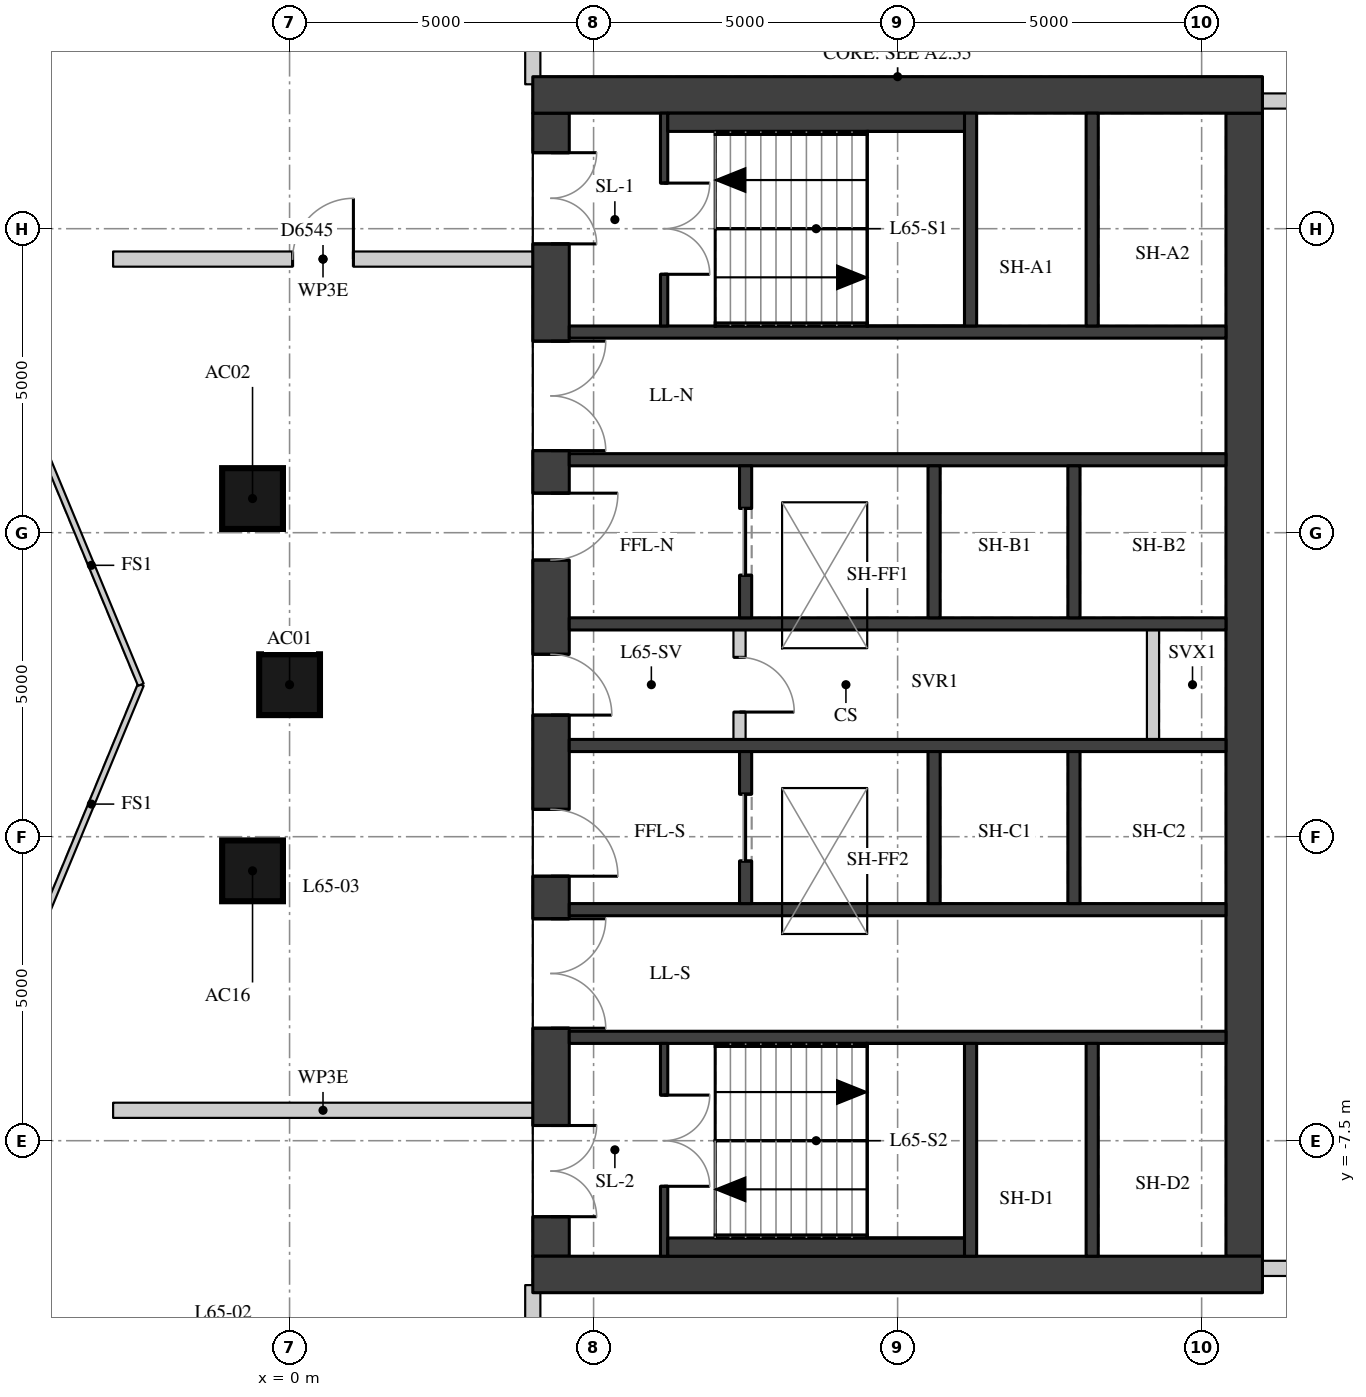
"""IFC4 building model, lengths in metres.
Left out: names, types, materials, properties, quantities, classifications, styles, units other than length and angle.
Written with IfcOpenShell. Run it as: python <this file> out.ifc"""

import sys

from ifc_helpers import new_model, si_unit, direction, frame, frame_2d, origin, origin_2d, place, context, subcontext, project, spatial, rectangle, extrude, element, fill, save


model = new_model("IFC4")
c1 = context("Model", 3, precision=1e-05, world=origin(), true_north=direction((0.0, 1.0)))
c2 = subcontext(c1, "Body", "Model", "MODEL_VIEW")
j1 = project(units=[si_unit("LENGTHUNIT", "METRE"), si_unit("PLANEANGLEUNIT", "RADIAN")], contexts=[c1])
p1 = place(None, origin())
s1 = spatial("IfcSite", under=j1, at=p1, CompositionType="ELEMENT")
p2 = place(p1, origin())
s2 = spatial("IfcBuilding", under=s1, at=p2, CompositionType="ELEMENT")
p3 = place(p2, frame((0.0, 0.0, 228.8)))
s3 = spatial("IfcBuildingStorey", under=s2, at=p3, CompositionType="ELEMENT", Elevation=228.8)
for number, where, z_axis, x_axis in (
    (1, (0.0, 0.0, 0.0), (0.0, 0.0, 1.0), (1.0, 0.0, 0.0)),
    (2, (-0.609, 3.062, 0.0), (0.0, 0.0, 1.0), (1.0, 0.0, 0.0)),
    (3, (-0.609, -3.062, 0.0), (0.0, 0.0, 1.0), (1.0, 0.0, 0.0)),
):
    element("IfcColumn", number, at=place(p3, frame(where, z_axis=z_axis, x_axis=x_axis)), inside=s3, PredefinedType="COLUMN", context=c2, shape_type="SweptSolid", body=[
        extrude(rectangle(XDim=1.0, YDim=1.0, at=origin_2d()), origin(), (0.0, 0.0, 1.0), 4.5),
    ])
p4 = place(p3, frame((4.3, -9.4, 0.0), z_axis=(0.0, 0.0, 1.0), x_axis=(0.0, 1.0, 0.0)))
e4 = element("IfcWall", 4, at=p4, inside=s3, PredefinedType="SHEAR", context=c2, shape_type="SweptSolid", body=[
    extrude(rectangle(XDim=18.8, YDim=0.6, at=frame_2d((9.4, 0.0))), origin(), (0.0, 0.0, 1.0), 4.22),
])
p5 = place(p4, frame((0.65, 0.0, 0.0)))
e5 = element("IfcOpeningElement", 5, at=p5, cuts=e4, PredefinedType="OPENING", context=c2, shape_type="SweptSolid", body=[
    extrude(rectangle(XDim=1.5, YDim=2.1, at=frame_2d((0.75, 1.05))), frame((0.0, 0.31, 0.0), z_axis=(0.0, -1.0, 0.0), x_axis=(1.0, 0.0, 0.0)), (0.0, 0.0, 1.0), 0.62),
])
p6 = place(p4, frame((3.75, 0.0, 0.0)))
e6 = element("IfcOpeningElement", 6, at=p6, cuts=e4, PredefinedType="OPENING", context=c2, shape_type="SweptSolid", body=[
    extrude(rectangle(XDim=1.8, YDim=2.1, at=frame_2d((0.9, 1.05))), frame((0.0, 0.31, 0.0), z_axis=(0.0, -1.0, 0.0), x_axis=(1.0, 0.0, 0.0)), (0.0, 0.0, 1.0), 0.62),
])
p7 = place(p4, frame((6.25, 0.0, 0.0)))
e7 = element("IfcOpeningElement", 7, at=p7, cuts=e4, PredefinedType="OPENING", context=c2, shape_type="SweptSolid", body=[
    extrude(rectangle(XDim=1.1, YDim=2.1, at=frame_2d((0.55, 1.05))), frame((0.0, 0.31, 0.0), z_axis=(0.0, -1.0, 0.0), x_axis=(1.0, 0.0, 0.0)), (0.0, 0.0, 1.0), 0.62),
])
p8 = place(p4, frame((8.9, 0.0, 0.0)))
e8 = element("IfcOpeningElement", 8, at=p8, cuts=e4, PredefinedType="OPENING", context=c2, shape_type="SweptSolid", body=[
    extrude(rectangle(XDim=1.0, YDim=2.1, at=frame_2d((0.5, 1.05))), frame((0.0, 0.31, 0.0), z_axis=(0.0, -1.0, 0.0), x_axis=(1.0, 0.0, 0.0)), (0.0, 0.0, 1.0), 0.62),
])
p9 = place(p4, frame((11.45, 0.0, 0.0)))
e9 = element("IfcOpeningElement", 9, at=p9, cuts=e4, PredefinedType="OPENING", context=c2, shape_type="SweptSolid", body=[
    extrude(rectangle(XDim=1.1, YDim=2.1, at=frame_2d((0.55, 1.05))), frame((0.0, 0.31, 0.0), z_axis=(0.0, -1.0, 0.0), x_axis=(1.0, 0.0, 0.0)), (0.0, 0.0, 1.0), 0.62),
])
p10 = place(p4, frame((13.25, 0.0, 0.0)))
e10 = element("IfcOpeningElement", 10, at=p10, cuts=e4, PredefinedType="OPENING", context=c2, shape_type="SweptSolid", body=[
    extrude(rectangle(XDim=1.8, YDim=2.1, at=frame_2d((0.9, 1.05))), frame((0.0, 0.31, 0.0), z_axis=(0.0, -1.0, 0.0), x_axis=(1.0, 0.0, 0.0)), (0.0, 0.0, 1.0), 0.62),
])
p11 = place(p4, frame((16.65, 0.0, 0.0)))
e11 = element("IfcOpeningElement", 11, at=p11, cuts=e4, PredefinedType="OPENING", context=c2, shape_type="SweptSolid", body=[
    extrude(rectangle(XDim=1.5, YDim=2.1, at=frame_2d((0.75, 1.05))), frame((0.0, 0.31, 0.0), z_axis=(0.0, -1.0, 0.0), x_axis=(1.0, 0.0, 0.0)), (0.0, 0.0, 1.0), 0.62),
])
p12 = place(p3, frame((15.7, -9.4, 0.0), z_axis=(0.0, 0.0, 1.0), x_axis=(0.0, 1.0, 0.0)))
e12 = element("IfcWall", 12, at=p12, inside=s3, PredefinedType="SHEAR", context=c2, shape_type="SweptSolid", body=[
    extrude(rectangle(XDim=18.8, YDim=0.6, at=frame_2d((9.4, 0.0))), origin(), (0.0, 0.0, 1.0), 4.22),
])
for number, where, z_axis, x_axis in (
    (13, (4.0, 9.7, 0.0), (0.0, 0.0, 1.0), (1.0, 0.0, 0.0)),
    (14, (4.0, -9.7, 0.0), (0.0, 0.0, 1.0), (1.0, 0.0, 0.0)),
):
    element("IfcWall", number, at=place(p3, frame(where, z_axis=z_axis, x_axis=x_axis)), inside=s3, PredefinedType="SHEAR", context=c2, shape_type="SweptSolid", body=[
        extrude(rectangle(XDim=12.0, YDim=0.6, at=frame_2d((6.0, 0.0))), origin(), (0.0, 0.0, 1.0), 4.22),
    ])
for number, where, z_axis, x_axis in (
    (15, (4.6, 5.8, 0.0), (0.0, 0.0, 1.0), (1.0, 0.0, 0.0)),
    (16, (4.6, 3.7, 0.0), (0.0, 0.0, 1.0), (1.0, 0.0, 0.0)),
    (17, (4.6, 1.0, 0.0), (0.0, 0.0, 1.0), (1.0, 0.0, 0.0)),
    (18, (4.6, -1.0, 0.0), (0.0, 0.0, 1.0), (1.0, 0.0, 0.0)),
    (19, (4.6, -3.7, 0.0), (0.0, 0.0, 1.0), (1.0, 0.0, 0.0)),
    (20, (4.6, -5.8, 0.0), (0.0, 0.0, 1.0), (1.0, 0.0, 0.0)),
):
    element("IfcWall", number, at=place(p3, frame(where, z_axis=z_axis, x_axis=x_axis)), inside=s3, PredefinedType="SHEAR", context=c2, shape_type="SweptSolid", body=[
        extrude(rectangle(XDim=10.8, YDim=0.2, at=frame_2d((5.4, 0.0))), origin(), (0.0, 0.0, 1.0), 4.22),
    ])
for number, where, z_axis, x_axis in (
    (21, (11.2, 5.9, 0.0), (0.0, 0.0, 1.0), (0.0, 1.0, 0.0)),
    (22, (11.2, -9.4, 0.0), (0.0, 0.0, 1.0), (0.0, 1.0, 0.0)),
    (23, (13.2, 5.9, 0.0), (0.0, 0.0, 1.0), (0.0, 1.0, 0.0)),
    (24, (13.2, -9.4, 0.0), (0.0, 0.0, 1.0), (0.0, 1.0, 0.0)),
):
    element("IfcWall", number, at=place(p3, frame(where, z_axis=z_axis, x_axis=x_axis)), inside=s3, PredefinedType="SHEAR", context=c2, shape_type="SweptSolid", body=[
        extrude(rectangle(XDim=3.5, YDim=0.2, at=frame_2d((1.75, 0.0))), origin(), (0.0, 0.0, 1.0), 4.22),
    ])
p13 = place(p3, frame((7.5, 1.1, 0.0), z_axis=(0.0, 0.0, 1.0), x_axis=(0.0, 1.0, 0.0)))
e25 = element("IfcWall", 25, at=p13, inside=s3, PredefinedType="SHEAR", context=c2, shape_type="SweptSolid", body=[
    extrude(rectangle(XDim=2.5, YDim=0.2, at=frame_2d((1.25, 0.0))), origin(), (0.0, 0.0, 1.0), 4.22),
])
p14 = place(p13, frame((0.7, 0.0, 0.0)))
e26 = element("IfcOpeningElement", 26, at=p14, cuts=e25, PredefinedType="OPENING", context=c2, shape_type="SweptSolid", body=[
    extrude(rectangle(XDim=1.1, YDim=2.1, at=frame_2d((0.55, 1.05))), frame((0.0, 0.11, 0.0), z_axis=(0.0, -1.0, 0.0), x_axis=(1.0, 0.0, 0.0)), (0.0, 0.0, 1.0), 0.22),
])
p15 = place(p3, frame((7.5, -3.6, 0.0), z_axis=(0.0, 0.0, 1.0), x_axis=(0.0, 1.0, 0.0)))
e27 = element("IfcWall", 27, at=p15, inside=s3, PredefinedType="SHEAR", context=c2, shape_type="SweptSolid", body=[
    extrude(rectangle(XDim=2.5, YDim=0.2, at=frame_2d((1.25, 0.0))), origin(), (0.0, 0.0, 1.0), 4.22),
])
p16 = place(p15, frame((0.7, 0.0, 0.0)))
e28 = element("IfcOpeningElement", 28, at=p16, cuts=e27, PredefinedType="OPENING", context=c2, shape_type="SweptSolid", body=[
    extrude(rectangle(XDim=1.1, YDim=2.1, at=frame_2d((0.55, 1.05))), frame((0.0, 0.11, 0.0), z_axis=(0.0, -1.0, 0.0), x_axis=(1.0, 0.0, 0.0)), (0.0, 0.0, 1.0), 0.22),
])
for number, where, z_axis, x_axis in (
    (29, (10.6, 1.1, 0.0), (0.0, 0.0, 1.0), (0.0, 1.0, 0.0)),
    (30, (10.6, -3.6, 0.0), (0.0, 0.0, 1.0), (0.0, 1.0, 0.0)),
    (31, (12.9, 1.1, 0.0), (0.0, 0.0, 1.0), (0.0, 1.0, 0.0)),
    (32, (12.9, -3.6, 0.0), (0.0, 0.0, 1.0), (0.0, 1.0, 0.0)),
):
    element("IfcWall", number, at=place(p3, frame(where, z_axis=z_axis, x_axis=x_axis)), inside=s3, PredefinedType="SHEAR", context=c2, shape_type="SweptSolid", body=[
        extrude(rectangle(XDim=2.5, YDim=0.2, at=frame_2d((1.25, 0.0))), origin(), (0.0, 0.0, 1.0), 4.22),
    ])
p17 = place(p3, frame((6.16, 5.9, 0.0), z_axis=(0.0, 0.0, 1.0), x_axis=(0.0, 1.0, 0.0)))
e33 = element("IfcWall", 33, at=p17, inside=s3, PredefinedType="SHEAR", context=c2, shape_type="SweptSolid", body=[
    extrude(rectangle(XDim=3.5, YDim=0.12, at=frame_2d((1.75, 0.0))), origin(), (0.0, 0.0, 1.0), 4.22),
])
p18 = place(p17, frame((0.85, 0.0, 0.0)))
e34 = element("IfcOpeningElement", 34, at=p18, cuts=e33, PredefinedType="OPENING", context=c2, shape_type="SweptSolid", body=[
    extrude(rectangle(XDim=1.5, YDim=2.1, at=frame_2d((0.75, 1.05))), frame((0.0, 0.07, 0.0), z_axis=(0.0, -1.0, 0.0), x_axis=(1.0, 0.0, 0.0)), (0.0, 0.0, 1.0), 0.14),
])
p19 = place(p3, frame((6.16, -9.4, 0.0), z_axis=(0.0, 0.0, 1.0), x_axis=(0.0, 1.0, 0.0)))
e35 = element("IfcWall", 35, at=p19, inside=s3, PredefinedType="SHEAR", context=c2, shape_type="SweptSolid", body=[
    extrude(rectangle(XDim=3.5, YDim=0.12, at=frame_2d((1.75, 0.0))), origin(), (0.0, 0.0, 1.0), 4.22),
])
p20 = place(p19, frame((1.15, 0.0, 0.0)))
e36 = element("IfcOpeningElement", 36, at=p20, cuts=e35, PredefinedType="OPENING", context=c2, shape_type="SweptSolid", body=[
    extrude(rectangle(XDim=1.5, YDim=2.1, at=frame_2d((0.75, 1.05))), frame((0.0, 0.07, 0.0), z_axis=(0.0, -1.0, 0.0), x_axis=(1.0, 0.0, 0.0)), (0.0, 0.0, 1.0), 0.14),
])
p21 = place(p3, frame((7.4, -0.9, 0.0), z_axis=(0.0, 0.0, 1.0), x_axis=(0.0, 1.0, 0.0)))
e37 = element("IfcWall", 37, at=p21, inside=s3, PredefinedType="PARTITIONING", context=c2, shape_type="SweptSolid", body=[
    extrude(rectangle(XDim=1.8, YDim=0.2, at=frame_2d((0.9, 0.0))), origin(), (0.0, 0.0, 1.0), 4.22),
])
p22 = place(p21, frame((0.45, 0.0, 0.0)))
e38 = element("IfcOpeningElement", 38, at=p22, cuts=e37, PredefinedType="OPENING", context=c2, shape_type="SweptSolid", body=[
    extrude(rectangle(XDim=0.9, YDim=2.1, at=frame_2d((0.45, 1.05))), frame((0.0, 0.11, 0.0), z_axis=(0.0, -1.0, 0.0), x_axis=(1.0, 0.0, 0.0)), (0.0, 0.0, 1.0), 0.22),
])
p23 = place(p3, frame((14.2, -0.9, 0.0), z_axis=(0.0, 0.0, 1.0), x_axis=(0.0, 1.0, 0.0)))
e39 = element("IfcWall", 39, at=p23, inside=s3, PredefinedType="PARTITIONING", context=c2, shape_type="SweptSolid", body=[
    extrude(rectangle(XDim=1.8, YDim=0.2, at=frame_2d((0.9, 0.0))), origin(), (0.0, 0.0, 1.0), 4.22),
])
for number, where, z_axis, x_axis in (
    (40, (6.22, 9.25, 0.0), (0.0, 0.0, 1.0), (1.0, 0.0, 0.0)),
    (41, (6.22, -9.25, 0.0), (0.0, 0.0, 1.0), (1.0, 0.0, 0.0)),
):
    element("IfcWall", number, at=place(p3, frame(where, z_axis=z_axis, x_axis=x_axis)), inside=s3, PredefinedType="PARTITIONING", context=c2, shape_type="SweptSolid", body=[
        extrude(rectangle(XDim=4.88, YDim=0.3, at=frame_2d((2.44, 0.0))), origin(), (0.0, 0.0, 1.0), 4.22),
    ])
p24 = place(p3, frame((15.998, -9.6, 0.0), z_axis=(0.0, 0.0, 1.0), x_axis=(1.0, 0.0, 0.0)))
e42 = element("IfcWall", 42, at=p24, inside=s3, PredefinedType="PARTITIONING", context=c2, shape_type="SweptSolid", body=[
    extrude(rectangle(XDim=6.172, YDim=0.25, at=frame_2d((3.086, 0.0))), origin(), (0.0, 0.0, 1.0), 4.22),
])
p25 = place(p3, frame((-2.902, -7.0, 0.0), z_axis=(0.0, 0.0, 1.0), x_axis=(1.0, 0.0, 0.0)))
e43 = element("IfcWall", 43, at=p25, inside=s3, PredefinedType="PARTITIONING", context=c2, shape_type="SweptSolid", body=[
    extrude(rectangle(XDim=6.904, YDim=0.25, at=frame_2d((3.452, 0.0))), origin(), (0.0, 0.0, 1.0), 3.67),
])
p26 = place(p3, frame((-2.902, 7.0, 0.0), z_axis=(0.0, 0.0, 1.0), x_axis=(1.0, 0.0, 0.0)))
e44 = element("IfcWall", 44, at=p26, inside=s3, PredefinedType="PARTITIONING", context=c2, shape_type="SweptSolid", body=[
    extrude(rectangle(XDim=6.904, YDim=0.25, at=frame_2d((3.452, 0.0))), origin(), (0.0, 0.0, 1.0), 3.67),
])
p27 = place(p26, frame((2.952, 0.0, 0.0)))
e45 = element("IfcOpeningElement", 45, at=p27, cuts=e44, PredefinedType="OPENING", context=c2, shape_type="SweptSolid", body=[
    extrude(rectangle(XDim=1.0, YDim=2.1, at=frame_2d((0.5, 1.05))), frame((0.0, 0.135, 0.0), z_axis=(0.0, -1.0, 0.0), x_axis=(1.0, 0.0, 0.0)), (0.0, 0.0, 1.0), 0.27),
])
p28 = place(p3, frame((15.998, 9.6, 0.0), z_axis=(0.0, 0.0, 1.0), x_axis=(1.0, 0.0, 0.0)))
e46 = element("IfcWall", 46, at=p28, inside=s3, PredefinedType="PARTITIONING", context=c2, shape_type="SweptSolid", body=[
    extrude(rectangle(XDim=7.053, YDim=0.25, at=frame_2d((3.526, 0.0))), origin(), (0.0, 0.0, 1.0), 4.22),
])
p29 = place(p28, frame((2.926, 0.0, 0.0)))
e47 = element("IfcOpeningElement", 47, at=p29, cuts=e46, PredefinedType="OPENING", context=c2, shape_type="SweptSolid", body=[
    extrude(rectangle(XDim=1.2, YDim=2.1, at=frame_2d((0.6, 1.05))), frame((0.0, 0.135, 0.0), z_axis=(0.0, -1.0, 0.0), x_axis=(1.0, 0.0, 0.0)), (0.0, 0.0, 1.0), 0.27),
])
for number, where, z_axis, x_axis in (
    (48, (4.0, -13.875, 0.0), (0.0, 0.0, 1.0), (0.0, 1.0, 0.0)),
    (49, (4.0, 9.875, 0.0), (0.0, 0.0, 1.0), (0.0, 1.0, 0.0)),
):
    element("IfcWall", number, at=place(p3, frame(where, z_axis=z_axis, x_axis=x_axis)), inside=s3, PredefinedType="PARTITIONING", context=c2, shape_type="SweptSolid", body=[
        extrude(rectangle(XDim=4.0, YDim=0.25, at=frame_2d((2.0, 0.0))), origin(), (0.0, 0.0, 1.0), 4.22),
    ])
for number, where, z_axis, x_axis in (
    (50, (-2.446, 0.0, 0.0), (0.0, 0.0, 1.0), (-0.383, -0.924, 0.0)),
    (51, (-4.073, 3.927, 0.0), (0.0, 0.0, 1.0), (0.383, -0.924, 0.0)),
):
    element("IfcWall", number, at=place(p3, frame(where, z_axis=z_axis, x_axis=x_axis)), inside=s3, PredefinedType="PARTITIONING", context=c2, shape_type="SweptSolid", body=[
        extrude(rectangle(XDim=4.251, YDim=0.1, at=frame_2d((2.125, 0.0))), origin(), (0.0, 0.0, 1.0), 4.22),
    ])
p30 = place(p5, origin())
e52 = element("IfcDoor", 52, at=p30, inside=s3, OperationType="DOUBLE_DOOR_SINGLE_SWING", PredefinedType="DOOR", context=c2, shape_type="SweptSolid", body=[
    extrude(rectangle(XDim=1.5, YDim=2.1, at=frame_2d((0.75, 1.05))), frame((0.0, 0.025, 0.0), z_axis=(0.0, -1.0, 0.0), x_axis=(1.0, 0.0, 0.0)), (0.0, 0.0, 1.0), 0.05),
])
fill(e5, e52)
p31 = place(p6, origin())
e53 = element("IfcDoor", 53, at=p31, inside=s3, OperationType="DOUBLE_DOOR_SINGLE_SWING", PredefinedType="DOOR", context=c2, shape_type="SweptSolid", body=[
    extrude(rectangle(XDim=1.8, YDim=2.1, at=frame_2d((0.9, 1.05))), frame((0.0, 0.025, 0.0), z_axis=(0.0, -1.0, 0.0), x_axis=(1.0, 0.0, 0.0)), (0.0, 0.0, 1.0), 0.05),
])
fill(e6, e53)
p32 = place(p7, origin())
e54 = element("IfcDoor", 54, at=p32, inside=s3, OperationType="SINGLE_SWING_RIGHT", PredefinedType="DOOR", context=c2, shape_type="SweptSolid", body=[
    extrude(rectangle(XDim=1.1, YDim=2.1, at=frame_2d((0.55, 1.05))), frame((0.0, 0.025, 0.0), z_axis=(0.0, -1.0, 0.0), x_axis=(1.0, 0.0, 0.0)), (0.0, 0.0, 1.0), 0.05),
])
fill(e7, e54)
p33 = place(p8, origin())
e55 = element("IfcDoor", 55, at=p33, inside=s3, OperationType="SINGLE_SWING_RIGHT", PredefinedType="DOOR", context=c2, shape_type="SweptSolid", body=[
    extrude(rectangle(XDim=1.0, YDim=2.1, at=frame_2d((0.5, 1.05))), frame((0.0, 0.025, 0.0), z_axis=(0.0, -1.0, 0.0), x_axis=(1.0, 0.0, 0.0)), (0.0, 0.0, 1.0), 0.05),
])
fill(e8, e55)
p34 = place(p9, origin())
e56 = element("IfcDoor", 56, at=p34, inside=s3, OperationType="SINGLE_SWING_LEFT", PredefinedType="DOOR", context=c2, shape_type="SweptSolid", body=[
    extrude(rectangle(XDim=1.1, YDim=2.1, at=frame_2d((0.55, 1.05))), frame((0.0, 0.025, 0.0), z_axis=(0.0, -1.0, 0.0), x_axis=(1.0, 0.0, 0.0)), (0.0, 0.0, 1.0), 0.05),
])
fill(e9, e56)
p35 = place(p10, origin())
e57 = element("IfcDoor", 57, at=p35, inside=s3, OperationType="DOUBLE_DOOR_SINGLE_SWING", PredefinedType="DOOR", context=c2, shape_type="SweptSolid", body=[
    extrude(rectangle(XDim=1.8, YDim=2.1, at=frame_2d((0.9, 1.05))), frame((0.0, 0.025, 0.0), z_axis=(0.0, -1.0, 0.0), x_axis=(1.0, 0.0, 0.0)), (0.0, 0.0, 1.0), 0.05),
])
fill(e10, e57)
p36 = place(p11, origin())
e58 = element("IfcDoor", 58, at=p36, inside=s3, OperationType="DOUBLE_DOOR_SINGLE_SWING", PredefinedType="DOOR", context=c2, shape_type="SweptSolid", body=[
    extrude(rectangle(XDim=1.5, YDim=2.1, at=frame_2d((0.75, 1.05))), frame((0.0, 0.025, 0.0), z_axis=(0.0, -1.0, 0.0), x_axis=(1.0, 0.0, 0.0)), (0.0, 0.0, 1.0), 0.05),
])
fill(e11, e58)
p37 = place(p18, origin())
e59 = element("IfcDoor", 59, at=p37, inside=s3, OperationType="DOUBLE_DOOR_SINGLE_SWING", PredefinedType="DOOR", context=c2, shape_type="SweptSolid", body=[
    extrude(rectangle(XDim=1.5, YDim=2.1, at=frame_2d((0.75, 1.05))), frame((0.0, 0.025, 0.0), z_axis=(0.0, -1.0, 0.0), x_axis=(1.0, 0.0, 0.0)), (0.0, 0.0, 1.0), 0.05),
])
fill(e34, e59)
p38 = place(p20, origin())
e60 = element("IfcDoor", 60, at=p38, inside=s3, OperationType="DOUBLE_DOOR_SINGLE_SWING", PredefinedType="DOOR", context=c2, shape_type="SweptSolid", body=[
    extrude(rectangle(XDim=1.5, YDim=2.1, at=frame_2d((0.75, 1.05))), frame((0.0, 0.025, 0.0), z_axis=(0.0, -1.0, 0.0), x_axis=(1.0, 0.0, 0.0)), (0.0, 0.0, 1.0), 0.05),
])
fill(e36, e60)
p39 = place(p14, origin())
e61 = element("IfcDoor", 61, at=p39, inside=s3, OperationType="DOUBLE_DOOR_SLIDING", PredefinedType="DOOR", context=c2, shape_type="SweptSolid", body=[
    extrude(rectangle(XDim=1.1, YDim=2.1, at=frame_2d((0.55, 1.05))), frame((0.0, 0.025, 0.0), z_axis=(0.0, -1.0, 0.0), x_axis=(1.0, 0.0, 0.0)), (0.0, 0.0, 1.0), 0.05),
])
fill(e26, e61)
p40 = place(p16, origin())
e62 = element("IfcDoor", 62, at=p40, inside=s3, OperationType="DOUBLE_DOOR_SLIDING", PredefinedType="DOOR", context=c2, shape_type="SweptSolid", body=[
    extrude(rectangle(XDim=1.1, YDim=2.1, at=frame_2d((0.55, 1.05))), frame((0.0, 0.025, 0.0), z_axis=(0.0, -1.0, 0.0), x_axis=(1.0, 0.0, 0.0)), (0.0, 0.0, 1.0), 0.05),
])
fill(e28, e62)
p41 = place(p22, origin())
e63 = element("IfcDoor", 63, at=p41, inside=s3, OperationType="SINGLE_SWING_RIGHT", PredefinedType="DOOR", context=c2, shape_type="SweptSolid", body=[
    extrude(rectangle(XDim=0.9, YDim=2.1, at=frame_2d((0.45, 1.05))), frame((0.0, 0.025, 0.0), z_axis=(0.0, -1.0, 0.0), x_axis=(1.0, 0.0, 0.0)), (0.0, 0.0, 1.0), 0.05),
])
fill(e38, e63)
p42 = place(p27, origin())
e64 = element("IfcDoor", 64, at=p42, inside=s3, OperationType="SINGLE_SWING_RIGHT", PredefinedType="DOOR", context=c2, shape_type="SweptSolid", body=[
    extrude(rectangle(XDim=1.0, YDim=2.1, at=frame_2d((0.5, 1.05))), frame((0.0, 0.025, 0.0), z_axis=(0.0, -1.0, 0.0), x_axis=(1.0, 0.0, 0.0)), (0.0, 0.0, 1.0), 0.05),
])
fill(e45, e64)
save(model, sys.argv[1])
